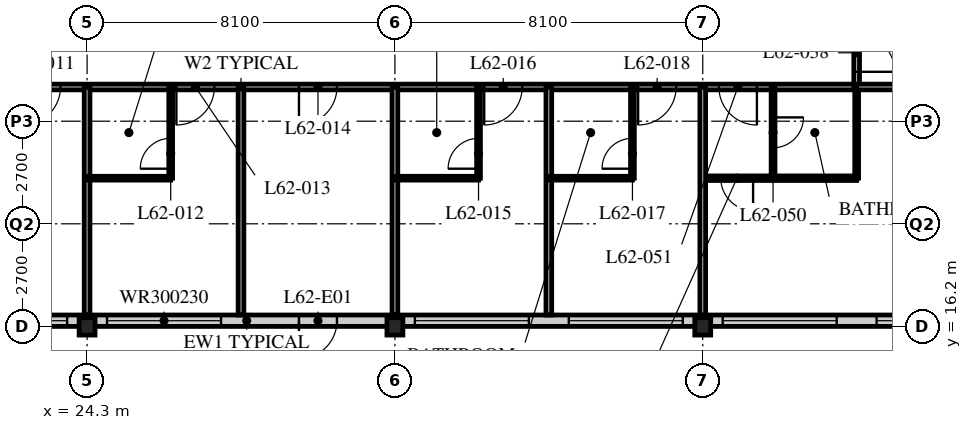
"""IFC4 building model, lengths in metres.
Left out: names, types, materials, properties, quantities, classifications, styles, units other than length and angle.
Written with IfcOpenShell. Run it as: python <this file> out.ifc"""

import sys

from ifc_helpers import new_model, si_unit, direction, frame, frame_2d, origin, origin_2d, place, context, subcontext, project, spatial, rectangle, i_section, extrude, element, fill, save


model = new_model("IFC4")
c1 = context("Model", 3, precision=1e-05, world=origin(), true_north=direction((0.0, 1.0)))
c2 = subcontext(c1, "Body", "Model", "MODEL_VIEW")
j1 = project(units=[si_unit("LENGTHUNIT", "METRE"), si_unit("PLANEANGLEUNIT", "RADIAN")], contexts=[c1])
p1 = place(None, origin())
s1 = spatial("IfcSite", under=j1, at=p1, CompositionType="ELEMENT")
p2 = place(p1, origin())
s2 = spatial("IfcBuilding", under=s1, at=p2, CompositionType="ELEMENT")
p3 = place(p2, frame((0.0, 0.0, 242.4)))
s3 = spatial("IfcBuildingStorey", under=s2, at=p3, CompositionType="ELEMENT", Elevation=242.4)
for number, where, z_axis, x_axis in (
    (1, (24.3, 16.2, 0.0), (0.0, 0.0, 1.0), (1.0, 0.0, 0.0)),
    (2, (32.4, 16.2, 0.0), (0.0, 0.0, 1.0), (1.0, 0.0, 0.0)),
    (3, (40.5, 16.2, 0.0), (0.0, 0.0, 1.0), (1.0, 0.0, 0.0)),
):
    element("IfcColumn", number, at=place(p3, frame(where, z_axis=z_axis, x_axis=x_axis)), inside=s3, PredefinedType="COLUMN", context=c2, shape_type="SweptSolid", body=[
        extrude(i_section(OverallWidth=0.418, OverallDepth=0.456, WebThickness=0.042, FlangeThickness=0.067, FilletRadius=0.015, at=origin_2d()), origin(), (0.0, 0.0, 1.0), 3.9),
    ])
p4 = place(p3, frame((8.4, 16.35, 0.0), z_axis=(0.0, 0.0, 1.0), x_axis=(1.0, 0.0, 0.0)))
e4 = element("IfcWall", 4, at=p4, inside=s3, PredefinedType="SOLIDWALL", context=c2, shape_type="SweptSolid", body=[
    extrude(rectangle(XDim=40.2, YDim=0.3, at=frame_2d((20.1, 0.0))), origin(), (0.0, 0.0, 1.0), 3.69),
])
p5 = place(p4, frame((21.475, 0.0, 0.0)))
e5 = element("IfcOpeningElement", 5, at=p5, cuts=e4, PredefinedType="OPENING", context=c2, shape_type="SweptSolid", body=[
    extrude(rectangle(XDim=1.0, YDim=2.1, at=frame_2d((0.5, 1.05))), frame((0.0, 0.16, 0.0), z_axis=(0.0, -1.0, 0.0), x_axis=(1.0, 0.0, 0.0)), (0.0, 0.0, 1.0), 0.32),
])
p6 = place(p4, frame((0.225, 0.0, 0.6)))
e6 = element("IfcOpeningElement", 6, at=p6, cuts=e4, PredefinedType="OPENING", context=c2, shape_type="SweptSolid", body=[
    extrude(rectangle(XDim=3.0, YDim=2.3, at=frame_2d((1.5, 1.15))), frame((0.0, 0.16, 0.0), z_axis=(0.0, -1.0, 0.0), x_axis=(1.0, 0.0, 0.0)), (0.0, 0.0, 1.0), 0.32),
])
p7 = place(p4, frame((4.275, 0.0, 0.6)))
e7 = element("IfcOpeningElement", 7, at=p7, cuts=e4, PredefinedType="OPENING", context=c2, shape_type="SweptSolid", body=[
    extrude(rectangle(XDim=3.0, YDim=2.3, at=frame_2d((1.5, 1.15))), frame((0.0, 0.16, 0.0), z_axis=(0.0, -1.0, 0.0), x_axis=(1.0, 0.0, 0.0)), (0.0, 0.0, 1.0), 0.32),
])
p8 = place(p4, frame((8.325, 0.0, 0.6)))
e8 = element("IfcOpeningElement", 8, at=p8, cuts=e4, PredefinedType="OPENING", context=c2, shape_type="SweptSolid", body=[
    extrude(rectangle(XDim=3.0, YDim=2.3, at=frame_2d((1.5, 1.15))), frame((0.0, 0.16, 0.0), z_axis=(0.0, -1.0, 0.0), x_axis=(1.0, 0.0, 0.0)), (0.0, 0.0, 1.0), 0.32),
])
p9 = place(p4, frame((12.375, 0.0, 0.6)))
e9 = element("IfcOpeningElement", 9, at=p9, cuts=e4, PredefinedType="OPENING", context=c2, shape_type="SweptSolid", body=[
    extrude(rectangle(XDim=3.0, YDim=2.3, at=frame_2d((1.5, 1.15))), frame((0.0, 0.16, 0.0), z_axis=(0.0, -1.0, 0.0), x_axis=(1.0, 0.0, 0.0)), (0.0, 0.0, 1.0), 0.32),
])
p10 = place(p4, frame((16.425, 0.0, 0.6)))
e10 = element("IfcOpeningElement", 10, at=p10, cuts=e4, PredefinedType="OPENING", context=c2, shape_type="SweptSolid", body=[
    extrude(rectangle(XDim=3.0, YDim=2.3, at=frame_2d((1.5, 1.15))), frame((0.0, 0.16, 0.0), z_axis=(0.0, -1.0, 0.0), x_axis=(1.0, 0.0, 0.0)), (0.0, 0.0, 1.0), 0.32),
])
p11 = place(p4, frame((24.525, 0.0, 0.6)))
e11 = element("IfcOpeningElement", 11, at=p11, cuts=e4, PredefinedType="OPENING", context=c2, shape_type="SweptSolid", body=[
    extrude(rectangle(XDim=3.0, YDim=2.3, at=frame_2d((1.5, 1.15))), frame((0.0, 0.16, 0.0), z_axis=(0.0, -1.0, 0.0), x_axis=(1.0, 0.0, 0.0)), (0.0, 0.0, 1.0), 0.32),
])
p12 = place(p4, frame((28.575, 0.0, 0.6)))
e12 = element("IfcOpeningElement", 12, at=p12, cuts=e4, PredefinedType="OPENING", context=c2, shape_type="SweptSolid", body=[
    extrude(rectangle(XDim=3.0, YDim=2.3, at=frame_2d((1.5, 1.15))), frame((0.0, 0.16, 0.0), z_axis=(0.0, -1.0, 0.0), x_axis=(1.0, 0.0, 0.0)), (0.0, 0.0, 1.0), 0.32),
])
p13 = place(p4, frame((32.625, 0.0, 0.6)))
e13 = element("IfcOpeningElement", 13, at=p13, cuts=e4, PredefinedType="OPENING", context=c2, shape_type="SweptSolid", body=[
    extrude(rectangle(XDim=3.0, YDim=2.3, at=frame_2d((1.5, 1.15))), frame((0.0, 0.16, 0.0), z_axis=(0.0, -1.0, 0.0), x_axis=(1.0, 0.0, 0.0)), (0.0, 0.0, 1.0), 0.32),
])
p14 = place(p4, frame((36.675, 0.0, 0.6)))
e14 = element("IfcOpeningElement", 14, at=p14, cuts=e4, PredefinedType="OPENING", context=c2, shape_type="SweptSolid", body=[
    extrude(rectangle(XDim=3.0, YDim=2.3, at=frame_2d((1.5, 1.15))), frame((0.0, 0.16, 0.0), z_axis=(0.0, -1.0, 0.0), x_axis=(1.0, 0.0, 0.0)), (0.0, 0.0, 1.0), 0.32),
])
p15 = place(p3, frame((12.15, 22.5, 0.0), z_axis=(0.0, 0.0, 1.0), x_axis=(1.0, 0.0, 0.0)))
e15 = element("IfcWall", 15, at=p15, inside=s3, PredefinedType="PARTITIONING", context=c2, shape_type="SweptSolid", body=[
    extrude(rectangle(XDim=32.4, YDim=0.15, at=frame_2d((16.2, 0.0))), origin(), (0.0, 0.0, 1.0), 3.69),
])
p16 = place(p15, frame((6.4, 0.0, 0.0)))
e16 = element("IfcOpeningElement", 16, at=p16, cuts=e15, PredefinedType="OPENING", context=c2, shape_type="SweptSolid", body=[
    extrude(rectangle(XDim=1.0, YDim=2.1, at=frame_2d((0.5, 1.05))), frame((0.0, 0.085, 0.0), z_axis=(0.0, -1.0, 0.0), x_axis=(1.0, 0.0, 0.0)), (0.0, 0.0, 1.0), 0.17),
])
p17 = place(p15, frame((10.45, 0.0, 0.0)))
e17 = element("IfcOpeningElement", 17, at=p17, cuts=e15, PredefinedType="OPENING", context=c2, shape_type="SweptSolid", body=[
    extrude(rectangle(XDim=1.0, YDim=2.1, at=frame_2d((0.5, 1.05))), frame((0.0, 0.085, 0.0), z_axis=(0.0, -1.0, 0.0), x_axis=(1.0, 0.0, 0.0)), (0.0, 0.0, 1.0), 0.17),
])
p18 = place(p15, frame((14.5, 0.0, 0.0)))
e18 = element("IfcOpeningElement", 18, at=p18, cuts=e15, PredefinedType="OPENING", context=c2, shape_type="SweptSolid", body=[
    extrude(rectangle(XDim=1.0, YDim=2.1, at=frame_2d((0.5, 1.05))), frame((0.0, 0.085, 0.0), z_axis=(0.0, -1.0, 0.0), x_axis=(1.0, 0.0, 0.0)), (0.0, 0.0, 1.0), 0.17),
])
p19 = place(p15, frame((17.725, 0.0, 0.0)))
e19 = element("IfcOpeningElement", 19, at=p19, cuts=e15, PredefinedType="OPENING", context=c2, shape_type="SweptSolid", body=[
    extrude(rectangle(XDim=1.0, YDim=2.1, at=frame_2d((0.5, 1.05))), frame((0.0, 0.085, 0.0), z_axis=(0.0, -1.0, 0.0), x_axis=(1.0, 0.0, 0.0)), (0.0, 0.0, 1.0), 0.17),
])
p20 = place(p15, frame((22.6, 0.0, 0.0)))
e20 = element("IfcOpeningElement", 20, at=p20, cuts=e15, PredefinedType="OPENING", context=c2, shape_type="SweptSolid", body=[
    extrude(rectangle(XDim=1.0, YDim=2.1, at=frame_2d((0.5, 1.05))), frame((0.0, 0.085, 0.0), z_axis=(0.0, -1.0, 0.0), x_axis=(1.0, 0.0, 0.0)), (0.0, 0.0, 1.0), 0.17),
])
p21 = place(p15, frame((26.65, 0.0, 0.0)))
e21 = element("IfcOpeningElement", 21, at=p21, cuts=e15, PredefinedType="OPENING", context=c2, shape_type="SweptSolid", body=[
    extrude(rectangle(XDim=1.0, YDim=2.1, at=frame_2d((0.5, 1.05))), frame((0.0, 0.085, 0.0), z_axis=(0.0, -1.0, 0.0), x_axis=(1.0, 0.0, 0.0)), (0.0, 0.0, 1.0), 0.17),
])
p22 = place(p15, frame((2.625, 0.0, 0.0)))
e22 = element("IfcOpeningElement", 22, at=p22, cuts=e15, PredefinedType="OPENING", context=c2, shape_type="SweptSolid", body=[
    extrude(rectangle(XDim=1.0, YDim=2.1, at=frame_2d((0.5, 1.05))), frame((0.0, 0.085, 0.0), z_axis=(0.0, -1.0, 0.0), x_axis=(1.0, 0.0, 0.0)), (0.0, 0.0, 1.0), 0.17),
])
p23 = place(p15, frame((28.775, 0.0, 0.0)))
e23 = element("IfcOpeningElement", 23, at=p23, cuts=e15, PredefinedType="OPENING", context=c2, shape_type="SweptSolid", body=[
    extrude(rectangle(XDim=1.0, YDim=2.1, at=frame_2d((0.5, 1.05))), frame((0.0, 0.085, 0.0), z_axis=(0.0, -1.0, 0.0), x_axis=(1.0, 0.0, 0.0)), (0.0, 0.0, 1.0), 0.17),
])
p24 = place(p3, frame((44.55, 22.5, 0.0), z_axis=(0.0, 0.0, 1.0), x_axis=(0.0, 1.0, 0.0)))
e24 = element("IfcWall", 24, at=p24, inside=s3, PredefinedType="PARTITIONING", context=c2, shape_type="SweptSolid", body=[
    extrude(rectangle(XDim=26.1, YDim=0.15, at=frame_2d((13.05, 0.0))), origin(), (0.0, 0.0, 1.0), 3.69),
])
p25 = place(p24, frame((0.4, 0.0, 0.0)))
e25 = element("IfcOpeningElement", 25, at=p25, cuts=e24, PredefinedType="OPENING", context=c2, shape_type="SweptSolid", body=[
    extrude(rectangle(XDim=1.0, YDim=2.1, at=frame_2d((0.5, 1.05))), frame((0.0, 0.085, 0.0), z_axis=(0.0, -1.0, 0.0), x_axis=(1.0, 0.0, 0.0)), (0.0, 0.0, 1.0), 0.17),
])
p26 = place(p24, frame((10.3, 0.0, 0.0)))
e26 = element("IfcOpeningElement", 26, at=p26, cuts=e24, PredefinedType="OPENING", context=c2, shape_type="SweptSolid", body=[
    extrude(rectangle(XDim=1.0, YDim=2.1, at=frame_2d((0.5, 1.05))), frame((0.0, 0.085, 0.0), z_axis=(0.0, -1.0, 0.0), x_axis=(1.0, 0.0, 0.0)), (0.0, 0.0, 1.0), 0.17),
])
p27 = place(p3, frame((24.3, 22.5, 0.0), z_axis=(0.0, 0.0, 1.0), x_axis=(0.0, -1.0, 0.0)))
e27 = element("IfcWall", 27, at=p27, inside=s3, PredefinedType="PARTITIONING", context=c2, shape_type="SweptSolid", body=[
    extrude(rectangle(XDim=6.0, YDim=0.15, at=frame_2d((3.0, 0.0))), origin(), (0.0, 0.0, 1.0), 2.928),
])
p28 = place(p3, frame((24.3, 20.1, 0.0), z_axis=(0.0, 0.0, 1.0), x_axis=(1.0, 0.0, 0.0)))
e28 = element("IfcWall", 28, at=p28, inside=s3, PredefinedType="PARTITIONING", context=c2, shape_type="SweptSolid", body=[
    extrude(rectangle(XDim=2.2, YDim=0.1, at=frame_2d((1.1, 0.0))), origin(), (0.0, 0.0, 1.0), 3.69),
])
p29 = place(p3, frame((26.5, 22.5, 0.0), z_axis=(0.0, 0.0, 1.0), x_axis=(0.0, -1.0, 0.0)))
e29 = element("IfcWall", 29, at=p29, inside=s3, PredefinedType="PARTITIONING", context=c2, shape_type="SweptSolid", body=[
    extrude(rectangle(XDim=2.4, YDim=0.1, at=frame_2d((1.2, 0.0))), origin(), (0.0, 0.0, 1.0), 3.69),
])
p30 = place(p29, frame((1.35, 0.0, 0.0)))
e30 = element("IfcOpeningElement", 30, at=p30, cuts=e29, PredefinedType="OPENING", context=c2, shape_type="SweptSolid", body=[
    extrude(rectangle(XDim=0.8, YDim=2.1, at=frame_2d((0.4, 1.05))), frame((0.0, 0.06, 0.0), z_axis=(0.0, -1.0, 0.0), x_axis=(1.0, 0.0, 0.0)), (0.0, 0.0, 1.0), 0.12),
])
p31 = place(p3, frame((28.35, 22.5, 0.0), z_axis=(0.0, 0.0, 1.0), x_axis=(0.0, -1.0, 0.0)))
e31 = element("IfcWall", 31, at=p31, inside=s3, PredefinedType="PARTITIONING", context=c2, shape_type="SweptSolid", body=[
    extrude(rectangle(XDim=6.0, YDim=0.15, at=frame_2d((3.0, 0.0))), origin(), (0.0, 0.0, 1.0), 3.69),
])
p32 = place(p3, frame((32.4, 22.5, 0.0), z_axis=(0.0, 0.0, 1.0), x_axis=(0.0, -1.0, 0.0)))
e32 = element("IfcWall", 32, at=p32, inside=s3, PredefinedType="PARTITIONING", context=c2, shape_type="SweptSolid", body=[
    extrude(rectangle(XDim=6.0, YDim=0.15, at=frame_2d((3.0, 0.0))), origin(), (0.0, 0.0, 1.0), 2.928),
])
p33 = place(p3, frame((32.4, 20.1, 0.0), z_axis=(0.0, 0.0, 1.0), x_axis=(1.0, 0.0, 0.0)))
e33 = element("IfcWall", 33, at=p33, inside=s3, PredefinedType="PARTITIONING", context=c2, shape_type="SweptSolid", body=[
    extrude(rectangle(XDim=2.2, YDim=0.1, at=frame_2d((1.1, 0.0))), origin(), (0.0, 0.0, 1.0), 3.69),
])
p34 = place(p3, frame((34.6, 22.5, 0.0), z_axis=(0.0, 0.0, 1.0), x_axis=(0.0, -1.0, 0.0)))
e34 = element("IfcWall", 34, at=p34, inside=s3, PredefinedType="PARTITIONING", context=c2, shape_type="SweptSolid", body=[
    extrude(rectangle(XDim=2.4, YDim=0.1, at=frame_2d((1.2, 0.0))), origin(), (0.0, 0.0, 1.0), 3.69),
])
p35 = place(p34, frame((1.35, 0.0, 0.0)))
e35 = element("IfcOpeningElement", 35, at=p35, cuts=e34, PredefinedType="OPENING", context=c2, shape_type="SweptSolid", body=[
    extrude(rectangle(XDim=0.8, YDim=2.1, at=frame_2d((0.4, 1.05))), frame((0.0, 0.06, 0.0), z_axis=(0.0, -1.0, 0.0), x_axis=(1.0, 0.0, 0.0)), (0.0, 0.0, 1.0), 0.12),
])
p36 = place(p3, frame((36.45, 22.5, 0.0), z_axis=(0.0, 0.0, 1.0), x_axis=(0.0, -1.0, 0.0)))
e36 = element("IfcWall", 36, at=p36, inside=s3, PredefinedType="PARTITIONING", context=c2, shape_type="SweptSolid", body=[
    extrude(rectangle(XDim=6.0, YDim=0.15, at=frame_2d((3.0, 0.0))), origin(), (0.0, 0.0, 1.0), 3.69),
])
p37 = place(p3, frame((36.45, 20.1, 0.0), z_axis=(0.0, 0.0, 1.0), x_axis=(1.0, 0.0, 0.0)))
e37 = element("IfcWall", 37, at=p37, inside=s3, PredefinedType="PARTITIONING", context=c2, shape_type="SweptSolid", body=[
    extrude(rectangle(XDim=2.2, YDim=0.1, at=frame_2d((1.1, 0.0))), origin(), (0.0, 0.0, 1.0), 3.69),
])
p38 = place(p3, frame((38.65, 22.5, 0.0), z_axis=(0.0, 0.0, 1.0), x_axis=(0.0, -1.0, 0.0)))
e38 = element("IfcWall", 38, at=p38, inside=s3, PredefinedType="PARTITIONING", context=c2, shape_type="SweptSolid", body=[
    extrude(rectangle(XDim=2.4, YDim=0.1, at=frame_2d((1.2, 0.0))), origin(), (0.0, 0.0, 1.0), 3.69),
])
p39 = place(p38, frame((1.35, 0.0, 0.0)))
e39 = element("IfcOpeningElement", 39, at=p39, cuts=e38, PredefinedType="OPENING", context=c2, shape_type="SweptSolid", body=[
    extrude(rectangle(XDim=0.8, YDim=2.1, at=frame_2d((0.4, 1.05))), frame((0.0, 0.06, 0.0), z_axis=(0.0, -1.0, 0.0), x_axis=(1.0, 0.0, 0.0)), (0.0, 0.0, 1.0), 0.12),
])
p40 = place(p3, frame((40.5, 20.1, 0.0), z_axis=(0.0, 0.0, 1.0), x_axis=(1.0, 0.0, 0.0)))
e40 = element("IfcWall", 40, at=p40, inside=s3, PredefinedType="PARTITIONING", context=c2, shape_type="SweptSolid", body=[
    extrude(rectangle(XDim=4.05, YDim=0.12, at=frame_2d((2.025, 0.0))), origin(), (0.0, 0.0, 1.0), 3.69),
])
p41 = place(p40, frame((0.475, 0.0, 0.0)))
e41 = element("IfcOpeningElement", 41, at=p41, cuts=e40, PredefinedType="OPENING", context=c2, shape_type="SweptSolid", body=[
    extrude(rectangle(XDim=0.85, YDim=2.1, at=frame_2d((0.425, 1.05))), frame((0.0, 0.07, 0.0), z_axis=(0.0, -1.0, 0.0), x_axis=(1.0, 0.0, 0.0)), (0.0, 0.0, 1.0), 0.14),
])
p42 = place(p3, frame((42.35, 22.5, 0.0), z_axis=(0.0, 0.0, 1.0), x_axis=(0.0, -1.0, 0.0)))
e42 = element("IfcWall", 42, at=p42, inside=s3, PredefinedType="PARTITIONING", context=c2, shape_type="SweptSolid", body=[
    extrude(rectangle(XDim=2.4, YDim=0.1, at=frame_2d((1.2, 0.0))), origin(), (0.0, 0.0, 1.0), 3.69),
])
p43 = place(p42, frame((0.8, 0.0, 0.0)))
e43 = element("IfcOpeningElement", 43, at=p43, cuts=e42, PredefinedType="OPENING", context=c2, shape_type="SweptSolid", body=[
    extrude(rectangle(XDim=0.8, YDim=2.1, at=frame_2d((0.4, 1.05))), frame((0.0, 0.06, 0.0), z_axis=(0.0, -1.0, 0.0), x_axis=(1.0, 0.0, 0.0)), (0.0, 0.0, 1.0), 0.12),
])
p44 = place(p3, frame((44.55, 22.5, 0.0), z_axis=(0.0, 0.0, 1.0), x_axis=(0.0, -1.0, 0.0)))
e44 = element("IfcWall", 44, at=p44, inside=s3, PredefinedType="PARTITIONING", context=c2, shape_type="SweptSolid", body=[
    extrude(rectangle(XDim=2.4, YDim=0.1, at=frame_2d((1.2, 0.0))), origin(), (0.0, 0.0, 1.0), 3.69),
])
p45 = place(p3, frame((44.55, 22.5, 0.0), z_axis=(0.0, 0.0, 1.0), x_axis=(1.0, 0.0, 0.0)))
e45 = element("IfcWall", 45, at=p45, inside=s3, PredefinedType="PARTITIONING", context=c2, shape_type="SweptSolid", body=[
    extrude(rectangle(XDim=7.8, YDim=0.15, at=frame_2d((3.9, 0.0))), origin(), (0.0, 0.0, 1.0), 3.69),
])
p46 = place(p3, frame((40.5, 22.5, 0.0), z_axis=(0.0, 0.0, 1.0), x_axis=(0.0, -1.0, 0.0)))
e46 = element("IfcWall", 46, at=p46, inside=s3, PredefinedType="PARTITIONING", context=c2, shape_type="SweptSolid", body=[
    extrude(rectangle(XDim=6.0, YDim=0.15, at=frame_2d((3.0, 0.0))), origin(), (0.0, 0.0, 1.0), 2.928),
])
p47 = place(p5, origin())
e47 = element("IfcDoor", 47, at=p47, inside=s3, OperationType="SINGLE_SWING_RIGHT", PredefinedType="DOOR", context=c2, shape_type="SweptSolid", body=[
    extrude(rectangle(XDim=1.0, YDim=2.1, at=frame_2d((0.5, 1.05))), frame((0.0, 0.025, 0.0), z_axis=(0.0, -1.0, 0.0), x_axis=(1.0, 0.0, 0.0)), (0.0, 0.0, 1.0), 0.05),
])
fill(e5, e47)
p48 = place(p9, origin())
e48 = element("IfcWindow", 48, at=p48, inside=s3, PartitioningType="SINGLE_PANEL", PredefinedType="WINDOW", context=c2, shape_type="SweptSolid", body=[
    extrude(rectangle(XDim=3.0, YDim=2.3, at=frame_2d((1.5, 1.15))), frame((0.0, 0.03, 0.0), z_axis=(0.0, -1.0, 0.0), x_axis=(1.0, 0.0, 0.0)), (0.0, 0.0, 1.0), 0.06),
])
fill(e9, e48)
p49 = place(p10, origin())
e49 = element("IfcWindow", 49, at=p49, inside=s3, PartitioningType="SINGLE_PANEL", PredefinedType="WINDOW", context=c2, shape_type="SweptSolid", body=[
    extrude(rectangle(XDim=3.0, YDim=2.3, at=frame_2d((1.5, 1.15))), frame((0.0, 0.03, 0.0), z_axis=(0.0, -1.0, 0.0), x_axis=(1.0, 0.0, 0.0)), (0.0, 0.0, 1.0), 0.06),
])
fill(e10, e49)
p50 = place(p11, origin())
e50 = element("IfcWindow", 50, at=p50, inside=s3, PartitioningType="SINGLE_PANEL", PredefinedType="WINDOW", context=c2, shape_type="SweptSolid", body=[
    extrude(rectangle(XDim=3.0, YDim=2.3, at=frame_2d((1.5, 1.15))), frame((0.0, 0.03, 0.0), z_axis=(0.0, -1.0, 0.0), x_axis=(1.0, 0.0, 0.0)), (0.0, 0.0, 1.0), 0.06),
])
fill(e11, e50)
p51 = place(p12, origin())
e51 = element("IfcWindow", 51, at=p51, inside=s3, PartitioningType="SINGLE_PANEL", PredefinedType="WINDOW", context=c2, shape_type="SweptSolid", body=[
    extrude(rectangle(XDim=3.0, YDim=2.3, at=frame_2d((1.5, 1.15))), frame((0.0, 0.03, 0.0), z_axis=(0.0, -1.0, 0.0), x_axis=(1.0, 0.0, 0.0)), (0.0, 0.0, 1.0), 0.06),
])
fill(e12, e51)
p52 = place(p13, origin())
e52 = element("IfcWindow", 52, at=p52, inside=s3, PartitioningType="SINGLE_PANEL", PredefinedType="WINDOW", context=c2, shape_type="SweptSolid", body=[
    extrude(rectangle(XDim=3.0, YDim=2.3, at=frame_2d((1.5, 1.15))), frame((0.0, 0.03, 0.0), z_axis=(0.0, -1.0, 0.0), x_axis=(1.0, 0.0, 0.0)), (0.0, 0.0, 1.0), 0.06),
])
fill(e13, e52)
p53 = place(p14, origin())
e53 = element("IfcWindow", 53, at=p53, inside=s3, PartitioningType="SINGLE_PANEL", PredefinedType="WINDOW", context=c2, shape_type="SweptSolid", body=[
    extrude(rectangle(XDim=3.0, YDim=2.3, at=frame_2d((1.5, 1.15))), frame((0.0, 0.03, 0.0), z_axis=(0.0, -1.0, 0.0), x_axis=(1.0, 0.0, 0.0)), (0.0, 0.0, 1.0), 0.06),
])
fill(e14, e53)
p54 = place(p17, origin())
e54 = element("IfcDoor", 54, at=p54, inside=s3, OperationType="SINGLE_SWING_RIGHT", PredefinedType="DOOR", context=c2, shape_type="SweptSolid", body=[
    extrude(rectangle(XDim=1.0, YDim=2.1, at=frame_2d((0.5, 1.05))), frame((0.0, 0.025, 0.0), z_axis=(0.0, -1.0, 0.0), x_axis=(1.0, 0.0, 0.0)), (0.0, 0.0, 1.0), 0.05),
])
fill(e17, e54)
p55 = place(p30, origin())
e55 = element("IfcDoor", 55, at=p55, inside=s3, OperationType="SINGLE_SWING_LEFT", PredefinedType="DOOR", context=c2, shape_type="SweptSolid", body=[
    extrude(rectangle(XDim=0.8, YDim=2.1, at=frame_2d((0.4, 1.05))), frame((0.0, 0.025, 0.0), z_axis=(0.0, -1.0, 0.0), x_axis=(1.0, 0.0, 0.0)), (0.0, 0.0, 1.0), 0.05),
])
fill(e30, e55)
p56 = place(p18, origin())
e56 = element("IfcDoor", 56, at=p56, inside=s3, OperationType="SINGLE_SWING_RIGHT", PredefinedType="DOOR", context=c2, shape_type="SweptSolid", body=[
    extrude(rectangle(XDim=1.0, YDim=2.1, at=frame_2d((0.5, 1.05))), frame((0.0, 0.025, 0.0), z_axis=(0.0, -1.0, 0.0), x_axis=(1.0, 0.0, 0.0)), (0.0, 0.0, 1.0), 0.05),
])
fill(e18, e56)
p57 = place(p19, origin())
e57 = element("IfcDoor", 57, at=p57, inside=s3, OperationType="SINGLE_SWING_RIGHT", PredefinedType="DOOR", context=c2, shape_type="SweptSolid", body=[
    extrude(rectangle(XDim=1.0, YDim=2.1, at=frame_2d((0.5, 1.05))), frame((0.0, 0.025, 0.0), z_axis=(0.0, -1.0, 0.0), x_axis=(1.0, 0.0, 0.0)), (0.0, 0.0, 1.0), 0.05),
])
fill(e19, e57)
p58 = place(p35, origin())
e58 = element("IfcDoor", 58, at=p58, inside=s3, OperationType="SINGLE_SWING_LEFT", PredefinedType="DOOR", context=c2, shape_type="SweptSolid", body=[
    extrude(rectangle(XDim=0.8, YDim=2.1, at=frame_2d((0.4, 1.05))), frame((0.0, 0.025, 0.0), z_axis=(0.0, -1.0, 0.0), x_axis=(1.0, 0.0, 0.0)), (0.0, 0.0, 1.0), 0.05),
])
fill(e35, e58)
p59 = place(p20, origin())
e59 = element("IfcDoor", 59, at=p59, inside=s3, OperationType="SINGLE_SWING_RIGHT", PredefinedType="DOOR", context=c2, shape_type="SweptSolid", body=[
    extrude(rectangle(XDim=1.0, YDim=2.1, at=frame_2d((0.5, 1.05))), frame((0.0, 0.025, 0.0), z_axis=(0.0, -1.0, 0.0), x_axis=(1.0, 0.0, 0.0)), (0.0, 0.0, 1.0), 0.05),
])
fill(e20, e59)
p60 = place(p39, origin())
e60 = element("IfcDoor", 60, at=p60, inside=s3, OperationType="SINGLE_SWING_LEFT", PredefinedType="DOOR", context=c2, shape_type="SweptSolid", body=[
    extrude(rectangle(XDim=0.8, YDim=2.1, at=frame_2d((0.4, 1.05))), frame((0.0, 0.025, 0.0), z_axis=(0.0, -1.0, 0.0), x_axis=(1.0, 0.0, 0.0)), (0.0, 0.0, 1.0), 0.05),
])
fill(e39, e60)
p61 = place(p21, origin())
e61 = element("IfcDoor", 61, at=p61, inside=s3, OperationType="SINGLE_SWING_RIGHT", PredefinedType="DOOR", context=c2, shape_type="SweptSolid", body=[
    extrude(rectangle(XDim=1.0, YDim=2.1, at=frame_2d((0.5, 1.05))), frame((0.0, 0.025, 0.0), z_axis=(0.0, -1.0, 0.0), x_axis=(1.0, 0.0, 0.0)), (0.0, 0.0, 1.0), 0.05),
])
fill(e21, e61)
p62 = place(p25, origin())
e62 = element("IfcDoor", 62, at=p62, inside=s3, OperationType="SINGLE_SWING_RIGHT", PredefinedType="DOOR", context=c2, shape_type="SweptSolid", body=[
    extrude(rectangle(XDim=1.0, YDim=2.1, at=frame_2d((0.5, 1.05))), frame((0.0, 0.025, 0.0), z_axis=(0.0, -1.0, 0.0), x_axis=(1.0, 0.0, 0.0)), (0.0, 0.0, 1.0), 0.05),
])
fill(e25, e62)
p63 = place(p43, origin())
e63 = element("IfcDoor", 63, at=p63, inside=s3, OperationType="SINGLE_SWING_LEFT", PredefinedType="DOOR", context=c2, shape_type="SweptSolid", body=[
    extrude(rectangle(XDim=0.8, YDim=2.1, at=frame_2d((0.4, 1.05))), frame((0.0, 0.025, 0.0), z_axis=(0.0, -1.0, 0.0), x_axis=(1.0, 0.0, 0.0)), (0.0, 0.0, 1.0), 0.05),
])
fill(e43, e63)
p64 = place(p23, origin())
e64 = element("IfcDoor", 64, at=p64, inside=s3, OperationType="SINGLE_SWING_LEFT", PredefinedType="DOOR", context=c2, shape_type="SweptSolid", body=[
    extrude(rectangle(XDim=1.0, YDim=2.1, at=frame_2d((0.5, 1.05))), frame((0.0, 0.025, 0.0), z_axis=(0.0, -1.0, 0.0), x_axis=(1.0, 0.0, 0.0)), (0.0, 0.0, 1.0), 0.05),
])
fill(e23, e64)
p65 = place(p41, origin())
e65 = element("IfcDoor", 65, at=p65, inside=s3, OperationType="SINGLE_SWING_LEFT", PredefinedType="DOOR", context=c2, shape_type="SweptSolid", body=[
    extrude(rectangle(XDim=0.85, YDim=2.1, at=frame_2d((0.425, 1.05))), frame((0.0, 0.025, 0.0), z_axis=(0.0, -1.0, 0.0), x_axis=(1.0, 0.0, 0.0)), (0.0, 0.0, 1.0), 0.05),
])
fill(e41, e65)
save(model, sys.argv[1])
